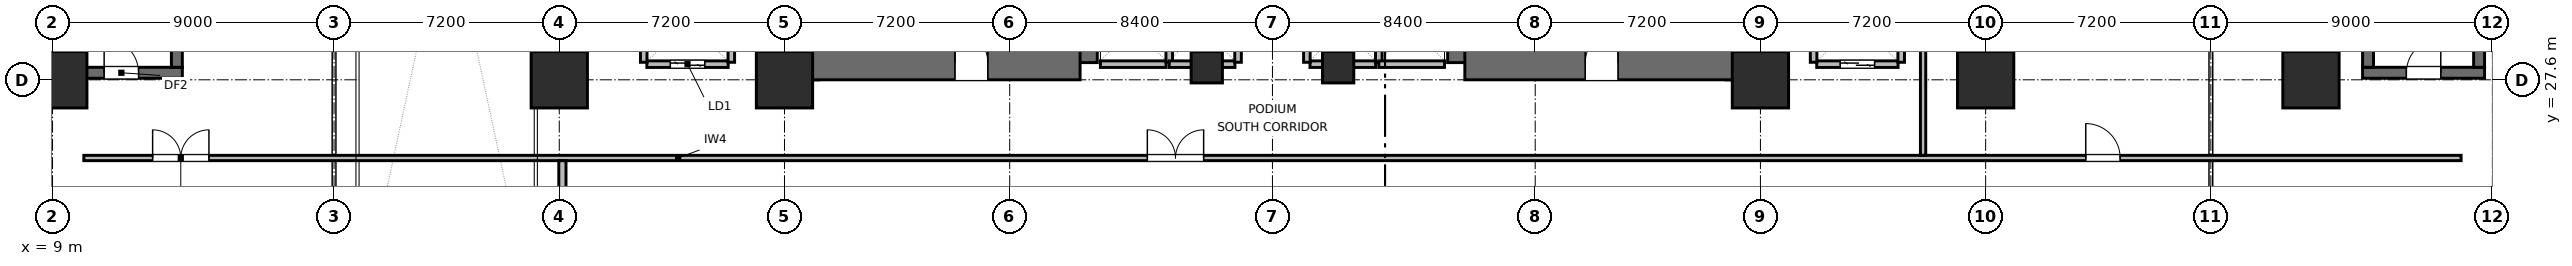
"""IFC4 building model, lengths in metres.
Left out: names, types, materials, properties, quantities, classifications, styles, units other than length and angle.
Written with IfcOpenShell. Run it as: python <this file> out.ifc"""

import sys

from ifc_helpers import new_model, si_unit, direction, frame, frame_2d, origin, origin_2d, place, context, subcontext, project, spatial, rectangle, extrude, element, fill, save


model = new_model("IFC4")
c1 = context("Model", 3, precision=1e-05, world=origin(), true_north=direction((0.0, 1.0)))
c2 = subcontext(c1, "Body", "Model", "MODEL_VIEW")
j1 = project(units=[si_unit("LENGTHUNIT", "METRE"), si_unit("PLANEANGLEUNIT", "RADIAN")], contexts=[c1])
p1 = place(None, origin())
s1 = spatial("IfcSite", under=j1, at=p1, CompositionType="ELEMENT")
p2 = place(p1, origin())
s2 = spatial("IfcBuilding", under=s1, at=p2, CompositionType="ELEMENT")
p3 = place(p2, frame((0.0, 0.0, 8.7)))
s3 = spatial("IfcBuildingStorey", under=s2, at=p3, CompositionType="ELEMENT", Elevation=8.7)
p4 = place(p3, frame((32.95, 27.6, 0.0), z_axis=(0.0, 0.0, 1.0), x_axis=(0.0, 1.0, 0.0)))
e1 = element("IfcWall", 1, at=p4, inside=s3, PredefinedType="SHEAR", context=c2, shape_type="SweptSolid", body=[
    extrude(rectangle(XDim=16.8, YDim=1.1, at=frame_2d((8.4, 0.0))), origin(), (0.0, 0.0, 1.0), 4.2),
])
p5 = place(p3, frame((41.85, 28.15, 0.0), z_axis=(0.0, 0.0, 1.0), x_axis=(0.0, 1.0, 0.0)))
e2 = element("IfcWall", 2, at=p5, inside=s3, PredefinedType="SHEAR", context=c2, shape_type="SweptSolid", body=[
    extrude(rectangle(XDim=6.25, YDim=1.1, at=frame_2d((3.125, 0.0))), origin(), (0.0, 0.0, 1.0), 4.2),
])
p6 = place(p3, frame((32.95, 28.15, 0.0), z_axis=(0.0, 0.0, 1.0), x_axis=(1.0, 0.0, 0.0)))
e3 = element("IfcWall", 3, at=p6, inside=s3, PredefinedType="SHEAR", context=c2, shape_type="SweptSolid", body=[
    extrude(rectangle(XDim=8.9, YDim=1.1, at=frame_2d((4.45, 0.0))), origin(), (0.0, 0.0, 1.0), 4.2),
])
p7 = place(p6, frame((4.9, 0.0, 0.0)))
e4 = element("IfcOpeningElement", 4, at=p7, cuts=e3, PredefinedType="OPENING", context=c2, shape_type="SweptSolid", body=[
    extrude(rectangle(XDim=1.05, YDim=2.04, at=frame_2d((0.525, 1.02))), frame((0.0, 0.56, 0.0), z_axis=(0.0, -1.0, 0.0), x_axis=(1.0, 0.0, 0.0)), (0.0, 0.0, 1.0), 1.12),
])
p8 = place(p3, frame((54.15, 28.15, 0.0), z_axis=(0.0, 0.0, 1.0), x_axis=(0.0, 1.0, 0.0)))
e5 = element("IfcWall", 5, at=p8, inside=s3, PredefinedType="SHEAR", context=c2, shape_type="SweptSolid", body=[
    extrude(rectangle(XDim=7.65, YDim=1.1, at=frame_2d((3.825, 0.0))), origin(), (0.0, 0.0, 1.0), 4.2),
])
p9 = place(p3, frame((63.05, 27.6, 0.0), z_axis=(0.0, 0.0, 1.0), x_axis=(0.0, 1.0, 0.0)))
e6 = element("IfcWall", 6, at=p9, inside=s3, PredefinedType="SHEAR", context=c2, shape_type="SweptSolid", body=[
    extrude(rectangle(XDim=16.8, YDim=1.1, at=frame_2d((8.4, 0.0))), origin(), (0.0, 0.0, 1.0), 4.2),
])
p10 = place(p3, frame((54.15, 28.15, 0.0), z_axis=(0.0, 0.0, 1.0), x_axis=(1.0, 0.0, 0.0)))
e7 = element("IfcWall", 7, at=p10, inside=s3, PredefinedType="SHEAR", context=c2, shape_type="SweptSolid", body=[
    extrude(rectangle(XDim=8.9, YDim=1.1, at=frame_2d((4.45, 0.0))), origin(), (0.0, 0.0, 1.0), 4.2),
])
p11 = place(p10, frame((3.85, 0.0, 0.0)))
e8 = element("IfcOpeningElement", 8, at=p11, cuts=e7, PredefinedType="OPENING", context=c2, shape_type="SweptSolid", body=[
    extrude(rectangle(XDim=1.05, YDim=2.04, at=frame_2d((0.525, 1.02))), frame((0.0, 0.56, 0.0), z_axis=(0.0, -1.0, 0.0), x_axis=(1.0, 0.0, 0.0)), (0.0, 0.0, 1.0), 1.12),
])
p12 = place(p3, frame((9.25, 27.825, 0.0), z_axis=(0.0, 0.0, 1.0), x_axis=(1.0, 0.0, 0.0)))
e9 = element("IfcWall", 9, at=p12, inside=s3, PredefinedType="SHEAR", context=c2, shape_type="SweptSolid", body=[
    extrude(rectangle(XDim=3.9, YDim=0.35, at=frame_2d((1.95, 0.0))), origin(), (0.0, 0.0, 1.0), 4.2),
])
p13 = place(p12, frame((1.4, 0.0, 0.0)))
e10 = element("IfcOpeningElement", 10, at=p13, cuts=e9, PredefinedType="OPENING", context=c2, shape_type="SweptSolid", body=[
    extrude(rectangle(XDim=1.1, YDim=2.05, at=frame_2d((0.55, 1.025))), frame((0.0, 0.185, 0.0), z_axis=(0.0, -1.0, 0.0), x_axis=(1.0, 0.0, 0.0)), (0.0, 0.0, 1.0), 0.37),
])
for number, where, z_axis, x_axis in (
    (11, (9.425, 28.0, 0.0), (0.0, 0.0, 1.0), (0.0, 1.0, 0.0)),
    (12, (12.975, 28.0, 0.0), (0.0, 0.0, 1.0), (0.0, 1.0, 0.0)),
):
    element("IfcWall", number, at=place(p3, frame(where, z_axis=z_axis, x_axis=x_axis)), inside=s3, PredefinedType="SHEAR", context=c2, shape_type="SweptSolid", body=[
        extrude(rectangle(XDim=8.4, YDim=0.35, at=frame_2d((4.2, 0.0))), origin(), (0.0, 0.0, 1.0), 4.2),
    ])
p14 = place(p3, frame((82.85, 27.825, 0.0), z_axis=(0.0, 0.0, 1.0), x_axis=(1.0, 0.0, 0.0)))
e13 = element("IfcWall", 13, at=p14, inside=s3, PredefinedType="SHEAR", context=c2, shape_type="SweptSolid", body=[
    extrude(rectangle(XDim=3.9, YDim=0.35, at=frame_2d((1.95, 0.0))), origin(), (0.0, 0.0, 1.0), 4.2),
])
p15 = place(p14, frame((1.4, 0.0, 0.0)))
e14 = element("IfcOpeningElement", 14, at=p15, cuts=e13, PredefinedType="OPENING", context=c2, shape_type="SweptSolid", body=[
    extrude(rectangle(XDim=1.1, YDim=2.05, at=frame_2d((0.55, 1.025))), frame((0.0, 0.185, 0.0), z_axis=(0.0, -1.0, 0.0), x_axis=(1.0, 0.0, 0.0)), (0.0, 0.0, 1.0), 0.37),
])
for number, where, z_axis, x_axis in (
    (15, (83.025, 28.0, 0.0), (0.0, 0.0, 1.0), (0.0, 1.0, 0.0)),
    (16, (86.575, 28.0, 0.0), (0.0, 0.0, 1.0), (0.0, 1.0, 0.0)),
):
    element("IfcWall", number, at=place(p3, frame(where, z_axis=z_axis, x_axis=x_axis)), inside=s3, PredefinedType="SHEAR", context=c2, shape_type="SweptSolid", body=[
        extrude(rectangle(XDim=8.4, YDim=0.35, at=frame_2d((4.2, 0.0))), origin(), (0.0, 0.0, 1.0), 4.2),
    ])
for number, where, z_axis, x_axis in (
    (17, (9.2, 27.6, 0.0), (0.0, 0.0, 1.0), (1.0, 0.0, 0.0)),
    (18, (25.2, 27.6, 0.0), (0.0, 0.0, 1.0), (1.0, 0.0, 0.0)),
    (19, (32.4, 27.6, 0.0), (0.0, 0.0, 1.0), (1.0, 0.0, 0.0)),
    (20, (63.6, 27.6, 0.0), (0.0, 0.0, 1.0), (1.0, 0.0, 0.0)),
    (21, (70.8, 27.6, 0.0), (0.0, 0.0, 1.0), (1.0, 0.0, 0.0)),
    (22, (81.2, 27.6, 0.0), (0.0, 0.0, 1.0), (1.0, 0.0, 0.0)),
):
    element("IfcColumn", number, at=place(p3, frame(where, z_axis=z_axis, x_axis=x_axis)), inside=s3, PredefinedType="COLUMN", context=c2, shape_type="SweptSolid", body=[
        extrude(rectangle(XDim=1.8, YDim=1.8, at=origin_2d()), origin(), (0.0, 0.0, 1.0), 4.2),
    ])
for number, where, z_axis, x_axis in (
    (23, (45.9, 28.0, 0.0), (0.0, 0.0, 1.0), (1.0, 0.0, 0.0)),
    (24, (50.1, 28.0, 0.0), (0.0, 0.0, 1.0), (1.0, 0.0, 0.0)),
):
    element("IfcColumn", number, at=place(p3, frame(where, z_axis=z_axis, x_axis=x_axis)), inside=s3, PredefinedType="COLUMN", context=c2, shape_type="SweptSolid", body=[
        extrude(rectangle(XDim=1.0, YDim=1.0, at=origin_2d()), origin(), (0.0, 0.0, 1.0), 4.2),
    ])
p16 = place(p3, frame((42.5, 28.1, 0.0), z_axis=(0.0, 0.0, 1.0), x_axis=(1.0, 0.0, 0.0)))
e25 = element("IfcWall", 25, at=p16, inside=s3, PredefinedType="PARTITIONING", context=c2, shape_type="SweptSolid", body=[
    extrude(rectangle(XDim=2.1, YDim=0.21, at=frame_2d((1.05, 0.0))), origin(), (0.0, 0.0, 1.0), 2.765),
])
p17 = place(p3, frame((44.7, 28.16, 0.0), z_axis=(0.0, 0.0, 1.0), x_axis=(0.0, 1.0, 0.0)))
e26 = element("IfcWall", 26, at=p17, inside=s3, PredefinedType="PARTITIONING", context=c2, shape_type="SweptSolid", body=[
    extrude(rectangle(XDim=2.28, YDim=0.21, at=frame_2d((1.14, 0.0))), origin(), (0.0, 0.0, 1.0), 3.88),
])
p18 = place(p3, frame((44.7, 28.1, 0.0), z_axis=(0.0, 0.0, 1.0), x_axis=(1.0, 0.0, 0.0)))
e27 = element("IfcWall", 27, at=p18, inside=s3, PredefinedType="PARTITIONING", context=c2, shape_type="SweptSolid", body=[
    extrude(rectangle(XDim=2.1, YDim=0.21, at=frame_2d((1.05, 0.0))), origin(), (0.0, 0.0, 1.0), 2.765),
])
p19 = place(p3, frame((46.9, 28.16, 0.0), z_axis=(0.0, 0.0, 1.0), x_axis=(0.0, 1.0, 0.0)))
e28 = element("IfcWall", 28, at=p19, inside=s3, PredefinedType="PARTITIONING", context=c2, shape_type="SweptSolid", body=[
    extrude(rectangle(XDim=2.28, YDim=0.21, at=frame_2d((1.14, 0.0))), origin(), (0.0, 0.0, 1.0), 3.88),
])
p20 = place(p3, frame((49.2, 28.1, 0.0), z_axis=(0.0, 0.0, 1.0), x_axis=(1.0, 0.0, 0.0)))
e29 = element("IfcWall", 29, at=p20, inside=s3, PredefinedType="PARTITIONING", context=c2, shape_type="SweptSolid", body=[
    extrude(rectangle(XDim=2.1, YDim=0.21, at=frame_2d((1.05, 0.0))), origin(), (0.0, 0.0, 1.0), 2.765),
])
for number, where, z_axis, x_axis in (
    (30, (49.1, 28.16, 0.0), (0.0, 0.0, 1.0), (0.0, 1.0, 0.0)),
    (31, (51.4, 28.16, 0.0), (0.0, 0.0, 1.0), (0.0, 1.0, 0.0)),
):
    element("IfcWall", number, at=place(p3, frame(where, z_axis=z_axis, x_axis=x_axis)), inside=s3, PredefinedType="PARTITIONING", context=c2, shape_type="SweptSolid", body=[
        extrude(rectangle(XDim=2.28, YDim=0.21, at=frame_2d((1.14, 0.0))), origin(), (0.0, 0.0, 1.0), 3.88),
    ])
p21 = place(p3, frame((51.4, 28.1, 0.0), z_axis=(0.0, 0.0, 1.0), x_axis=(1.0, 0.0, 0.0)))
e32 = element("IfcWall", 32, at=p21, inside=s3, PredefinedType="PARTITIONING", context=c2, shape_type="SweptSolid", body=[
    extrude(rectangle(XDim=2.1, YDim=0.21, at=frame_2d((1.05, 0.0))), origin(), (0.0, 0.0, 1.0), 2.765),
])
p22 = place(p3, frame((28.0, 28.1, 0.0), z_axis=(0.0, 0.0, 1.0), x_axis=(1.0, 0.0, 0.0)))
e33 = element("IfcWall", 33, at=p22, inside=s3, PredefinedType="PARTITIONING", context=c2, shape_type="SweptSolid", body=[
    extrude(rectangle(XDim=2.6, YDim=0.21, at=frame_2d((1.3, 0.0))), origin(), (0.0, 0.0, 1.0), 3.88),
])
p23 = place(p22, frame((0.75, 0.0, 0.0)))
e34 = element("IfcOpeningElement", 34, at=p23, cuts=e33, PredefinedType="OPENING", context=c2, shape_type="SweptSolid", body=[
    extrude(rectangle(XDim=1.1, YDim=2.04, at=frame_2d((0.55, 1.02))), frame((0.0, 0.115, 0.0), z_axis=(0.0, -1.0, 0.0), x_axis=(1.0, 0.0, 0.0)), (0.0, 0.0, 1.0), 0.23),
])
for number, where, z_axis, x_axis in (
    (35, (27.9, 28.16, 0.0), (0.0, 0.0, 1.0), (0.0, 1.0, 0.0)),
    (36, (30.7, 28.16, 0.0), (0.0, 0.0, 1.0), (0.0, 1.0, 0.0)),
):
    element("IfcWall", number, at=place(p3, frame(where, z_axis=z_axis, x_axis=x_axis)), inside=s3, PredefinedType="PARTITIONING", context=c2, shape_type="SweptSolid", body=[
        extrude(rectangle(XDim=2.48, YDim=0.21, at=frame_2d((1.24, 0.0))), origin(), (0.0, 0.0, 1.0), 3.88),
    ])
p24 = place(p3, frame((65.4, 28.1, 0.0), z_axis=(0.0, 0.0, 1.0), x_axis=(1.0, 0.0, 0.0)))
e37 = element("IfcWall", 37, at=p24, inside=s3, PredefinedType="PARTITIONING", context=c2, shape_type="SweptSolid", body=[
    extrude(rectangle(XDim=2.6, YDim=0.21, at=frame_2d((1.3, 0.0))), origin(), (0.0, 0.0, 1.0), 3.88),
])
p25 = place(p24, frame((0.75, 0.0, 0.0)))
e38 = element("IfcOpeningElement", 38, at=p25, cuts=e37, PredefinedType="OPENING", context=c2, shape_type="SweptSolid", body=[
    extrude(rectangle(XDim=1.1, YDim=2.04, at=frame_2d((0.55, 1.02))), frame((0.0, 0.115, 0.0), z_axis=(0.0, -1.0, 0.0), x_axis=(1.0, 0.0, 0.0)), (0.0, 0.0, 1.0), 0.23),
])
for number, where, z_axis, x_axis in (
    (39, (65.3, 28.16, 0.0), (0.0, 0.0, 1.0), (0.0, 1.0, 0.0)),
    (40, (68.1, 28.16, 0.0), (0.0, 0.0, 1.0), (0.0, 1.0, 0.0)),
):
    element("IfcWall", number, at=place(p3, frame(where, z_axis=z_axis, x_axis=x_axis)), inside=s3, PredefinedType="PARTITIONING", context=c2, shape_type="SweptSolid", body=[
        extrude(rectangle(XDim=2.48, YDim=0.21, at=frame_2d((1.24, 0.0))), origin(), (0.0, 0.0, 1.0), 3.88),
    ])
p26 = place(p3, frame((10.0, 25.1, 0.0), z_axis=(0.0, 0.0, 1.0), x_axis=(1.0, 0.0, 0.0)))
e41 = element("IfcWall", 41, at=p26, inside=s3, PredefinedType="PARTITIONING", context=c2, shape_type="SweptSolid", body=[
    extrude(rectangle(XDim=76.0, YDim=0.17, at=frame_2d((38.0, 0.0))), origin(), (0.0, 0.0, 1.0), 3.88),
])
p27 = place(p26, frame((2.2, 0.0, 0.0)))
e42 = element("IfcOpeningElement", 42, at=p27, cuts=e41, PredefinedType="OPENING", context=c2, shape_type="SweptSolid", body=[
    extrude(rectangle(XDim=1.8, YDim=2.06, at=frame_2d((0.9, 1.03))), frame((0.0, 0.095, 0.0), z_axis=(0.0, -1.0, 0.0), x_axis=(1.0, 0.0, 0.0)), (0.0, 0.0, 1.0), 0.19),
])
p28 = place(p26, frame((34.0, 0.0, 0.0)))
e43 = element("IfcOpeningElement", 43, at=p28, cuts=e41, PredefinedType="OPENING", context=c2, shape_type="SweptSolid", body=[
    extrude(rectangle(XDim=1.8, YDim=2.06, at=frame_2d((0.9, 1.03))), frame((0.0, 0.095, 0.0), z_axis=(0.0, -1.0, 0.0), x_axis=(1.0, 0.0, 0.0)), (0.0, 0.0, 1.0), 0.19),
])
p29 = place(p26, frame((64.0, 0.0, 0.0)))
e44 = element("IfcOpeningElement", 44, at=p29, cuts=e41, PredefinedType="OPENING", context=c2, shape_type="SweptSolid", body=[
    extrude(rectangle(XDim=1.1, YDim=2.05, at=frame_2d((0.55, 1.025))), frame((0.0, 0.095, 0.0), z_axis=(0.0, -1.0, 0.0), x_axis=(1.0, 0.0, 0.0)), (0.0, 0.0, 1.0), 0.19),
])
p30 = place(p3, frame((68.8, 25.187, 0.0), z_axis=(0.0, 0.0, 1.0), x_axis=(0.0, 1.0, 0.0)))
e45 = element("IfcWall", 45, at=p30, inside=s3, PredefinedType="PARTITIONING", context=c2, shape_type="SweptSolid", body=[
    extrude(rectangle(XDim=46.448, YDim=0.17, at=frame_2d((23.224, 0.0))), origin(), (0.0, 0.0, 1.0), 3.88),
])
p31 = place(p30, frame((15.913, 0.0, 0.0)))
e46 = element("IfcOpeningElement", 46, at=p31, cuts=e45, PredefinedType="OPENING", context=c2, shape_type="SweptSolid", body=[
    extrude(rectangle(XDim=1.1, YDim=2.05, at=frame_2d((0.55, 1.025))), frame((0.0, 0.095, 0.0), z_axis=(0.0, -1.0, 0.0), x_axis=(1.0, 0.0, 0.0)), (0.0, 0.0, 1.0), 0.19),
])
p32 = place(p3, frame((25.3, 0.355, 0.0), z_axis=(0.0, 0.0, 1.0), x_axis=(0.0, 1.0, 0.0)))
e47 = element("IfcWall", 47, at=p32, inside=s3, PredefinedType="PARTITIONING", context=c2, shape_type="SweptSolid", body=[
    extrude(rectangle(XDim=24.658, YDim=0.23, at=frame_2d((12.329, 0.0))), origin(), (0.0, 0.0, 1.0), 3.092),
])
p33 = place(p13, origin())
e48 = element("IfcDoor", 48, at=p33, inside=s3, OperationType="SINGLE_SWING_LEFT", PredefinedType="DOOR", context=c2, shape_type="SweptSolid", body=[
    extrude(rectangle(XDim=1.1, YDim=2.05, at=frame_2d((0.55, 1.025))), frame((0.0, 0.025, 0.0), z_axis=(0.0, -1.0, 0.0), x_axis=(1.0, 0.0, 0.0)), (0.0, 0.0, 1.0), 0.05),
])
fill(e10, e48)
p34 = place(p15, origin())
e49 = element("IfcDoor", 49, at=p34, inside=s3, OperationType="SINGLE_SWING_RIGHT", PredefinedType="DOOR", context=c2, shape_type="SweptSolid", body=[
    extrude(rectangle(XDim=1.1, YDim=2.05, at=frame_2d((0.55, 1.025))), frame((0.0, 0.025, 0.0), z_axis=(0.0, -1.0, 0.0), x_axis=(1.0, 0.0, 0.0)), (0.0, 0.0, 1.0), 0.05),
])
fill(e14, e49)
p35 = place(p23, origin())
e50 = element("IfcDoor", 50, at=p35, inside=s3, OperationType="DOUBLE_DOOR_SLIDING", PredefinedType="DOOR", context=c2, shape_type="SweptSolid", body=[
    extrude(rectangle(XDim=1.1, YDim=2.04, at=frame_2d((0.55, 1.02))), frame((0.0, 0.025, 0.0), z_axis=(0.0, -1.0, 0.0), x_axis=(1.0, 0.0, 0.0)), (0.0, 0.0, 1.0), 0.05),
])
fill(e34, e50)
p36 = place(p25, origin())
e51 = element("IfcDoor", 51, at=p36, inside=s3, OperationType="DOUBLE_DOOR_SLIDING", PredefinedType="DOOR", context=c2, shape_type="SweptSolid", body=[
    extrude(rectangle(XDim=1.1, YDim=2.04, at=frame_2d((0.55, 1.02))), frame((0.0, 0.025, 0.0), z_axis=(0.0, -1.0, 0.0), x_axis=(1.0, 0.0, 0.0)), (0.0, 0.0, 1.0), 0.05),
])
fill(e38, e51)
p37 = place(p7, origin())
e52 = element("IfcDoor", 52, at=p37, inside=s3, OperationType="SINGLE_SWING_LEFT", PredefinedType="DOOR", context=c2, shape_type="SweptSolid", body=[
    extrude(rectangle(XDim=1.05, YDim=2.04, at=frame_2d((0.525, 1.02))), frame((0.0, 0.025, 0.0), z_axis=(0.0, -1.0, 0.0), x_axis=(1.0, 0.0, 0.0)), (0.0, 0.0, 1.0), 0.05),
])
fill(e4, e52)
p38 = place(p11, origin())
e53 = element("IfcDoor", 53, at=p38, inside=s3, OperationType="SINGLE_SWING_RIGHT", PredefinedType="DOOR", context=c2, shape_type="SweptSolid", body=[
    extrude(rectangle(XDim=1.05, YDim=2.04, at=frame_2d((0.525, 1.02))), frame((0.0, 0.025, 0.0), z_axis=(0.0, -1.0, 0.0), x_axis=(1.0, 0.0, 0.0)), (0.0, 0.0, 1.0), 0.05),
])
fill(e8, e53)
p39 = place(p27, origin())
e54 = element("IfcDoor", 54, at=p39, inside=s3, OperationType="DOUBLE_DOOR_SINGLE_SWING", PredefinedType="DOOR", context=c2, shape_type="SweptSolid", body=[
    extrude(rectangle(XDim=1.8, YDim=2.06, at=frame_2d((0.9, 1.03))), frame((0.0, 0.025, 0.0), z_axis=(0.0, -1.0, 0.0), x_axis=(1.0, 0.0, 0.0)), (0.0, 0.0, 1.0), 0.05),
])
fill(e42, e54)
p40 = place(p28, origin())
e55 = element("IfcDoor", 55, at=p40, inside=s3, OperationType="DOUBLE_DOOR_SINGLE_SWING", PredefinedType="DOOR", context=c2, shape_type="SweptSolid", body=[
    extrude(rectangle(XDim=1.8, YDim=2.06, at=frame_2d((0.9, 1.03))), frame((0.0, 0.025, 0.0), z_axis=(0.0, -1.0, 0.0), x_axis=(1.0, 0.0, 0.0)), (0.0, 0.0, 1.0), 0.05),
])
fill(e43, e55)
p41 = place(p29, origin())
e56 = element("IfcDoor", 56, at=p41, inside=s3, OperationType="SINGLE_SWING_LEFT", PredefinedType="DOOR", context=c2, shape_type="SweptSolid", body=[
    extrude(rectangle(XDim=1.1, YDim=2.05, at=frame_2d((0.55, 1.025))), frame((0.0, 0.025, 0.0), z_axis=(0.0, -1.0, 0.0), x_axis=(1.0, 0.0, 0.0)), (0.0, 0.0, 1.0), 0.05),
])
fill(e44, e56)
save(model, sys.argv[1])
